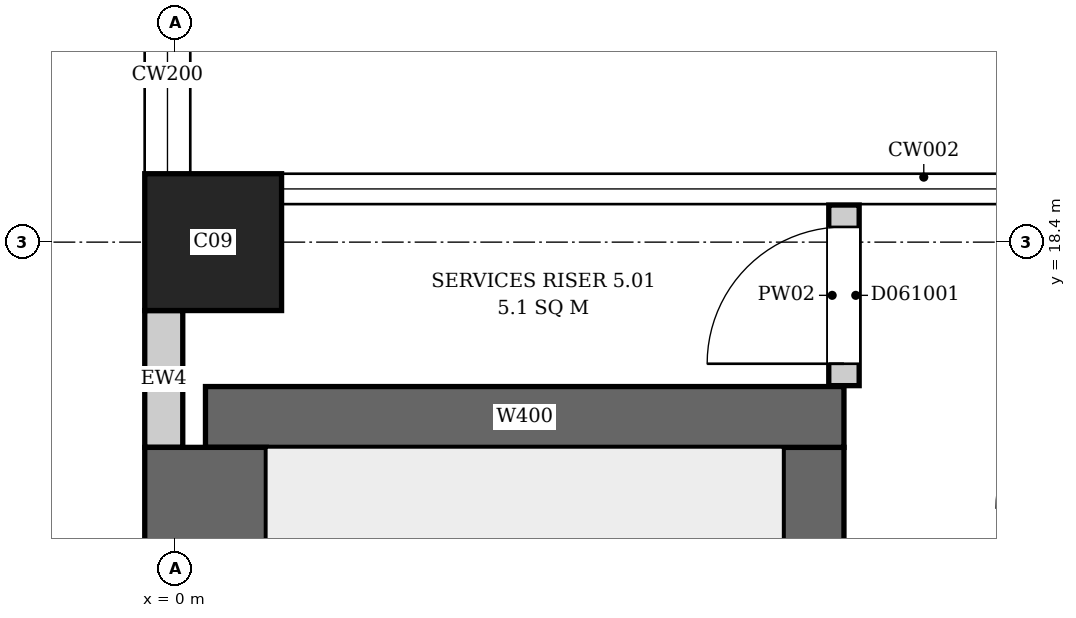
"""IFC4 building model, lengths in metres.
Left out: names, types, materials, properties, quantities, classifications, styles, units other than length and angle.
Written with IfcOpenShell. Run it as: python <this file> out.ifc"""

import sys

from ifc_helpers import new_model, si_unit, direction, frame, frame_2d, origin, origin_2d, place, context, subcontext, project, spatial, rectangle, extrude, element, fill, save


model = new_model("IFC4")
c1 = context("Model", 3, precision=1e-05, world=origin(), true_north=direction((0.0, 1.0)))
c2 = subcontext(c1, "Body", "Model", "MODEL_VIEW")
j1 = project(units=[si_unit("LENGTHUNIT", "METRE"), si_unit("PLANEANGLEUNIT", "RADIAN")], contexts=[c1])
p1 = place(None, origin())
s1 = spatial("IfcSite", under=j1, at=p1, CompositionType="ELEMENT")
p2 = place(p1, origin())
s2 = spatial("IfcBuilding", under=s1, at=p2, CompositionType="ELEMENT")
p3 = place(p2, frame((0.0, 0.0, 31.9)))
s3 = spatial("IfcBuildingStorey", under=s2, at=p3, CompositionType="ELEMENT", Elevation=31.9)
p4 = place(p3, frame((0.2, 17.25, 0.0), z_axis=(0.0, 0.0, 1.0), x_axis=(1.0, 0.0, 0.0)))
e1 = element("IfcWall", 1, at=p4, inside=s3, PredefinedType="SHEAR", context=c2, shape_type="SweptSolid", body=[
    extrude(rectangle(XDim=4.2, YDim=0.4, at=frame_2d((2.1, 0.0))), origin(), (0.0, 0.0, 1.0), 4.2),
])
p5 = place(p3, frame((0.2, 10.45, 0.0), z_axis=(0.0, 0.0, 1.0), x_axis=(0.0, 1.0, 0.0)))
e2 = element("IfcWall", 2, at=p5, inside=s3, PredefinedType="SHEAR", context=c2, shape_type="SweptSolid", body=[
    extrude(rectangle(XDim=6.6, YDim=0.8, at=frame_2d((3.3, 0.0))), origin(), (0.0, 0.0, 1.0), 4.2),
])
p6 = place(p3, frame((4.2, 10.45, 0.0), z_axis=(0.0, 0.0, 1.0), x_axis=(0.0, 1.0, 0.0)))
e3 = element("IfcWall", 3, at=p6, inside=s3, PredefinedType="SHEAR", context=c2, shape_type="SweptSolid", body=[
    extrude(rectangle(XDim=6.6, YDim=0.4, at=frame_2d((3.3, 0.0))), origin(), (0.0, 0.0, 1.0), 4.2),
])
p7 = place(p6, frame((0.21, 0.0, 0.0)))
e4 = element("IfcOpeningElement", 4, at=p7, cuts=e3, PredefinedType="OPENING", context=c2, shape_type="SweptSolid", body=[
    extrude(rectangle(XDim=1.2, YDim=2.1, at=frame_2d((0.6, 1.05))), frame((0.0, 0.21, 0.0), z_axis=(0.0, -1.0, 0.0), x_axis=(1.0, 0.0, 0.0)), (0.0, 0.0, 1.0), 0.42),
])
p8 = place(p3, frame((0.25, 18.4, 0.0), z_axis=(0.0, 0.0, 1.0), x_axis=(1.0, 0.0, 0.0)))
e5 = element("IfcColumn", 5, at=p8, inside=s3, PredefinedType="COLUMN", context=c2, shape_type="SweptSolid", body=[
    extrude(rectangle(XDim=0.9, YDim=0.9, at=origin_2d()), origin(), (0.0, 0.0, 1.0), 4.2),
])
p9 = place(p3, frame((-0.074, 17.95, 0.0), z_axis=(0.0, 0.0, 1.0), x_axis=(0.0, -1.0, 0.0)))
e6 = element("IfcWall", 6, at=p9, inside=s3, PredefinedType="ELEMENTEDWALL", context=c2, shape_type="SweptSolid", body=[
    extrude(rectangle(XDim=0.9, YDim=0.25, at=frame_2d((0.45, 0.0))), origin(), (0.0, 0.0, 1.0), 3.9),
])
p10 = place(p3, frame((4.4, 17.456, 0.0), z_axis=(0.0, 0.0, 1.0), x_axis=(0.0, 1.0, 0.0)))
e7 = element("IfcWall", 7, at=p10, inside=s3, PredefinedType="PARTITIONING", context=c2, shape_type="SweptSolid", body=[
    extrude(rectangle(XDim=1.188, YDim=0.2, at=frame_2d((0.594, 0.0))), origin(), (0.0, 0.0, 1.0), 3.9),
])
p11 = place(p10, frame((0.144, 0.0, 0.0)))
e8 = element("IfcOpeningElement", 8, at=p11, cuts=e7, PredefinedType="OPENING", context=c2, shape_type="SweptSolid", body=[
    extrude(rectangle(XDim=0.9, YDim=2.1, at=frame_2d((0.45, 1.05))), frame((0.0, 0.11, 0.0), z_axis=(0.0, -1.0, 0.0), x_axis=(1.0, 0.0, 0.0)), (0.0, 0.0, 1.0), 0.22),
])
p12 = place(p11, origin())
e9 = element("IfcDoor", 9, at=p12, inside=s3, OperationType="SINGLE_SWING_LEFT", PredefinedType="DOOR", context=c2, shape_type="SweptSolid", body=[
    extrude(rectangle(XDim=0.9, YDim=2.1, at=frame_2d((0.45, 1.05))), frame((0.0, 0.025, 0.0), z_axis=(0.0, -1.0, 0.0), x_axis=(1.0, 0.0, 0.0)), (0.0, 0.0, 1.0), 0.05),
])
fill(e8, e9)
save(model, sys.argv[1])
